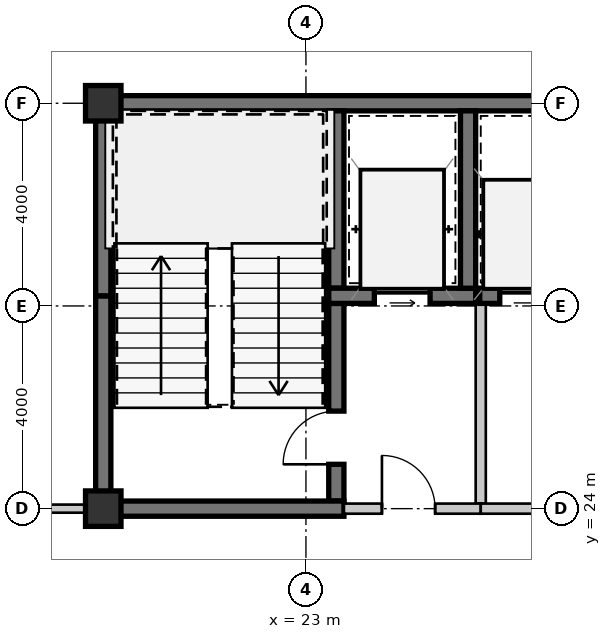
"""IFC4 building model, lengths in metres.
Left out: names, types, materials, properties, quantities, classifications, styles, units other than length and angle.
Written with IfcOpenShell. Run it as: python <this file> out.ifc"""

import sys

from ifc_helpers import new_model, si_unit, direction, frame, frame_2d, origin, origin_2d, place, context, subcontext, project, spatial, rectangle, extrude, source, transform, mapped, element, fill, save


model = new_model("IFC4")
c1 = context("Model", 3, precision=1e-05, world=origin(), true_north=direction((0.0, 1.0)))
c2 = subcontext(c1, "Body", "Model", "MODEL_VIEW")
j1 = project(units=[si_unit("LENGTHUNIT", "METRE"), si_unit("PLANEANGLEUNIT", "RADIAN")], contexts=[c1])
p1 = place(None, origin())
s1 = spatial("IfcSite", under=j1, at=p1, CompositionType="ELEMENT")
p2 = place(p1, origin())
s2 = spatial("IfcBuilding", under=s1, at=p2, CompositionType="ELEMENT")
p3 = place(p2, frame((0.0, 0.0, 93.45)))
s3 = spatial("IfcBuildingStorey", under=s2, at=p3, CompositionType="ELEMENT", Elevation=93.45)
m1 = source(origin(), c2, "Body", "SweptSolid", [
    extrude(rectangle(XDim=0.7, YDim=0.7, at=origin_2d()), origin(), (0.0, 0.0, 1.0), 3.15),
])
for number, where, z_axis, x_axis in (
    (1, (19.0, 24.0, 0.0), (0.0, 0.0, 1.0), (1.0, 0.0, 0.0)),
    (2, (19.0, 32.0, 0.0), (0.0, 0.0, 1.0), (1.0, 0.0, 0.0)),
):
    element("IfcColumn", number, at=place(p3, frame(where, z_axis=z_axis, x_axis=x_axis)), inside=s3, PredefinedType="COLUMN", context=c2, shape_type="MappedRepresentation", body=[
        mapped(m1, transform((0.0, 0.0, 0.0), scale=1.0)),
    ])
m2 = source(origin(), c2, "Body", "SweptSolid", [
    extrude(rectangle(XDim=9.15, YDim=0.3, at=frame_2d((4.575, 0.0))), origin(), (0.0, 0.0, 1.0), 2.93),
])
p4 = place(p3, frame((18.85, 32.0, 0.0), z_axis=(0.0, 0.0, 1.0), x_axis=(1.0, 0.0, 0.0)))
e3 = element("IfcWall", 3, at=p4, inside=s3, PredefinedType="SHEAR", context=c2, shape_type="MappedRepresentation", body=[
    mapped(m2, transform((0.0, 0.0, 0.0), scale=1.0)),
])
m3 = source(origin(), c2, "Body", "SweptSolid", [
    extrude(rectangle(XDim=4.05, YDim=0.3, at=frame_2d((2.025, 0.0))), origin(), (0.0, 0.0, 1.0), 2.93),
])
p5 = place(p3, frame((19.0, 24.15, 0.0), z_axis=(0.0, 0.0, 1.0), x_axis=(0.0, 1.0, 0.0)))
e4 = element("IfcWall", 4, at=p5, inside=s3, PredefinedType="SHEAR", context=c2, shape_type="MappedRepresentation", body=[
    mapped(m3, transform((0.0, 0.0, 0.0), scale=1.0)),
])
m4 = source(origin(), c2, "Body", "SweptSolid", [
    extrude(rectangle(XDim=3.65, YDim=0.3, at=frame_2d((1.825, 0.0))), origin(), (0.0, 0.0, 1.0), 2.93),
])
p6 = place(p3, frame((19.0, 28.2, 0.0), z_axis=(0.0, 0.0, 1.0), x_axis=(0.0, 1.0, 0.0)))
e5 = element("IfcWall", 5, at=p6, inside=s3, PredefinedType="SHEAR", context=c2, shape_type="MappedRepresentation", body=[
    mapped(m4, transform((0.0, 0.0, 0.0), scale=1.0)),
])
m5 = source(origin(), c2, "Body", "SweptSolid", [
    extrude(rectangle(XDim=3.5, YDim=0.3, at=frame_2d((1.75, 0.0))), origin(), (0.0, 0.0, 1.0), 2.93),
])
p7 = place(p3, frame((23.6, 28.35, 0.0), z_axis=(0.0, 0.0, 1.0), x_axis=(0.0, 1.0, 0.0)))
e6 = element("IfcWall", 6, at=p7, inside=s3, PredefinedType="SHEAR", context=c2, shape_type="MappedRepresentation", body=[
    mapped(m5, transform((0.0, 0.0, 0.0), scale=1.0)),
])
m6 = source(origin(), c2, "Body", "SweptSolid", [
    extrude(rectangle(XDim=3.9, YDim=0.3, at=frame_2d((1.95, 0.0))), origin(), (0.0, 0.0, 1.0), 2.93),
])
p8 = place(p3, frame((23.6, 24.15, 0.0), z_axis=(0.0, 0.0, 1.0), x_axis=(0.0, 1.0, 0.0)))
e7 = element("IfcWall", 7, at=p8, inside=s3, PredefinedType="SHEAR", context=c2, shape_type="MappedRepresentation", body=[
    mapped(m6, transform((0.0, 0.0, 0.0), scale=1.0)),
])
m7 = source(origin(), c2, "Body", "SweptSolid", [
    extrude(rectangle(XDim=1.05, YDim=2.1, at=frame_2d((0.525, 1.05))), frame((0.0, 0.16, 0.0), z_axis=(0.0, -1.0, 0.0), x_axis=(1.0, 0.0, 0.0)), (0.0, 0.0, 1.0), 0.32),
])
p9 = place(p8, frame((0.725, 0.0, 0.0)))
e8 = element("IfcOpeningElement", 8, at=p9, cuts=e7, PredefinedType="OPENING", context=c2, shape_type="MappedRepresentation", body=[
    mapped(m7, transform((0.0, 0.0, 0.0), scale=1.0)),
])
m8 = source(origin(), c2, "Body", "SweptSolid", [
    extrude(rectangle(XDim=4.9, YDim=0.3, at=frame_2d((2.45, 0.0))), origin(), (0.0, 0.0, 1.0), 2.93),
])
p10 = place(p3, frame((18.85, 24.0, 0.0), z_axis=(0.0, 0.0, 1.0), x_axis=(1.0, 0.0, 0.0)))
e9 = element("IfcWall", 9, at=p10, inside=s3, PredefinedType="SHEAR", context=c2, shape_type="MappedRepresentation", body=[
    mapped(m8, transform((0.0, 0.0, 0.0), scale=1.0)),
])
m9 = source(origin(), c2, "Body", "SweptSolid", [
    extrude(rectangle(XDim=2.9, YDim=0.3, at=frame_2d((1.45, 0.0))), origin(), (0.0, 0.0, 1.0), 2.93),
])
p11 = place(p3, frame((23.45, 28.2, 0.0), z_axis=(0.0, 0.0, 1.0), x_axis=(1.0, 0.0, 0.0)))
e10 = element("IfcWall", 10, at=p11, inside=s3, PredefinedType="SHEAR", context=c2, shape_type="MappedRepresentation", body=[
    mapped(m9, transform((0.0, 0.0, 0.0), scale=1.0)),
])
m10 = source(origin(), c2, "Body", "SweptSolid", [
    extrude(rectangle(XDim=1.1, YDim=2.15, at=frame_2d((0.55, 1.075))), frame((0.0, 0.16, 0.0), z_axis=(0.0, -1.0, 0.0), x_axis=(1.0, 0.0, 0.0)), (0.0, 0.0, 1.0), 0.32),
])
p12 = place(p11, frame((0.9, 0.0, 0.0)))
e11 = element("IfcOpeningElement", 11, at=p12, cuts=e10, PredefinedType="OPENING", context=c2, shape_type="MappedRepresentation", body=[
    mapped(m10, transform((0.0, 0.0, 0.0), scale=1.0)),
])
p13 = place(p3, frame((26.2, 28.35, 0.0), z_axis=(0.0, 0.0, 1.0), x_axis=(0.0, 1.0, 0.0)))
e12 = element("IfcWall", 12, at=p13, inside=s3, PredefinedType="SHEAR", context=c2, shape_type="MappedRepresentation", body=[
    mapped(m5, transform((0.0, 0.0, 0.0), scale=1.0)),
])
m11 = source(origin(), c2, "Body", "SweptSolid", [
    extrude(rectangle(XDim=3.95, YDim=0.2, at=frame_2d((1.975, 0.0))), origin(), (0.0, 0.0, 1.0), 2.93),
])
p14 = place(p3, frame((26.45, 24.1, 0.0), z_axis=(0.0, 0.0, 1.0), x_axis=(0.0, 1.0, 0.0)))
e13 = element("IfcWall", 13, at=p14, inside=s3, PredefinedType="SOLIDWALL", context=c2, shape_type="MappedRepresentation", body=[
    mapped(m11, transform((0.0, 0.0, 0.0), scale=1.0)),
])
m12 = source(origin(), c2, "Body", "SweptSolid", [
    extrude(rectangle(XDim=2.7, YDim=0.2, at=frame_2d((1.35, 0.0))), origin(), (0.0, 0.0, 1.0), 2.47),
])
p15 = place(p3, frame((23.75, 24.0, 0.0), z_axis=(0.0, 0.0, 1.0), x_axis=(1.0, 0.0, 0.0)))
e14 = element("IfcWall", 14, at=p15, inside=s3, PredefinedType="SOLIDWALL", context=c2, shape_type="MappedRepresentation", body=[
    mapped(m12, transform((0.0, 0.0, 0.0), scale=1.0)),
])
m13 = source(origin(), c2, "Body", "SweptSolid", [
    extrude(rectangle(XDim=1.05, YDim=2.1, at=frame_2d((0.525, 1.05))), frame((0.0, 0.11, 0.0), z_axis=(0.0, -1.0, 0.0), x_axis=(1.0, 0.0, 0.0)), (0.0, 0.0, 1.0), 0.22),
])
p16 = place(p15, frame((0.75, 0.0, 0.0)))
e15 = element("IfcOpeningElement", 15, at=p16, cuts=e14, PredefinedType="OPENING", context=c2, shape_type="MappedRepresentation", body=[
    mapped(m13, transform((0.0, 0.0, 0.0), scale=1.0)),
])
m14 = source(origin(), c2, "Body", "SweptSolid", [
    extrude(rectangle(XDim=2.07, YDim=0.3, at=frame_2d((1.035, 0.0))), origin(), (0.0, 0.0, 1.0), 2.93),
])
p17 = place(p3, frame((26.43, 28.2, 0.0), z_axis=(0.0, 0.0, 1.0), x_axis=(1.0, 0.0, 0.0)))
e16 = element("IfcWall", 16, at=p17, inside=s3, PredefinedType="SHEAR", context=c2, shape_type="MappedRepresentation", body=[
    mapped(m14, transform((0.0, 0.0, 0.0), scale=1.0)),
])
m15 = source(origin(), c2, "Body", "SweptSolid", [
    extrude(rectangle(XDim=1.05, YDim=2.15, at=frame_2d((0.525, 1.075))), frame((0.0, 0.16, 0.0), z_axis=(0.0, -1.0, 0.0), x_axis=(1.0, 0.0, 0.0)), (0.0, 0.0, 1.0), 0.32),
])
p18 = place(p17, frame((0.395, 0.0, 0.0)))
e17 = element("IfcOpeningElement", 17, at=p18, cuts=e16, PredefinedType="OPENING", context=c2, shape_type="MappedRepresentation", body=[
    mapped(m15, transform((0.0, 0.0, 0.0), scale=1.0)),
])
m16 = source(origin(), c2, "Body", "SweptSolid", [
    extrude(rectangle(XDim=4.35, YDim=0.2, at=frame_2d((2.175, 0.0))), origin(), (0.0, 0.0, 1.0), 2.47),
])
p19 = place(p3, frame((30.8, 24.0, 0.0), z_axis=(0.0, 0.0, 1.0), x_axis=(-1.0, 0.0, 0.0)))
e18 = element("IfcWall", 18, at=p19, inside=s3, PredefinedType="SOLIDWALL", context=c2, shape_type="MappedRepresentation", body=[
    mapped(m16, transform((0.0, 0.0, 0.0), scale=1.0)),
])
p20 = place(p19, frame((0.75, 0.0, 0.0)))
e19 = element("IfcOpeningElement", 19, at=p20, cuts=e18, PredefinedType="OPENING", context=c2, shape_type="MappedRepresentation", body=[
    mapped(m13, transform((0.0, 0.0, 0.0), scale=1.0)),
])
m17 = source(origin(), c2, "Body", "SweptSolid", [
    extrude(rectangle(XDim=4.17, YDim=0.16, at=frame_2d((2.085, 0.0))), origin(), (0.0, 0.0, 1.0), 2.93),
])
p21 = place(p3, frame((14.68, 24.0, 0.0), z_axis=(0.0, 0.0, 1.0), x_axis=(1.0, 0.0, 0.0)))
e20 = element("IfcWall", 20, at=p21, inside=s3, PredefinedType="PARTITIONING", context=c2, shape_type="MappedRepresentation", body=[
    mapped(m17, transform((0.0, 0.0, 0.0), scale=1.0)),
])
m18 = source(origin(), c2, "Body", "SweptSolid", [
    extrude(rectangle(XDim=0.92, YDim=2.1, at=frame_2d((0.46, 1.05))), frame((0.0, 0.09, 0.0), z_axis=(0.0, -1.0, 0.0), x_axis=(1.0, 0.0, 0.0)), (0.0, 0.0, 1.0), 0.18),
])
p22 = place(p21, frame((1.69, 0.0, 0.0)))
e21 = element("IfcOpeningElement", 21, at=p22, cuts=e20, PredefinedType="OPENING", context=c2, shape_type="MappedRepresentation", body=[
    mapped(m18, transform((0.0, 0.0, 0.0), scale=1.0)),
])
m19 = source(origin(), c2, "Body", "SweptSolid", [
    extrude(rectangle(XDim=1.05, YDim=2.1, at=frame_2d((0.525, 1.05))), frame((0.0, 0.025, 0.0), z_axis=(0.0, -1.0, 0.0), x_axis=(1.0, 0.0, 0.0)), (0.0, 0.0, 1.0), 0.05),
])
p23 = place(p9, origin())
e22 = element("IfcDoor", 22, at=p23, inside=s3, OperationType="SINGLE_SWING_LEFT", PredefinedType="DOOR", context=c2, shape_type="MappedRepresentation", body=[
    mapped(m19, transform((0.0, 0.0, 0.0), scale=1.0)),
])
fill(e8, e22)
m20 = source(origin(), c2, "Body", "SweptSolid", [
    extrude(rectangle(XDim=1.1, YDim=2.15, at=frame_2d((0.55, 1.075))), frame((0.0, 0.025, 0.0), z_axis=(0.0, -1.0, 0.0), x_axis=(1.0, 0.0, 0.0)), (0.0, 0.0, 1.0), 0.05),
])
p24 = place(p12, origin())
e23 = element("IfcDoor", 23, at=p24, inside=s3, OperationType="SLIDING_TO_LEFT", PredefinedType="DOOR", context=c2, shape_type="MappedRepresentation", body=[
    mapped(m20, transform((0.0, 0.0, 0.0), scale=1.0)),
])
fill(e11, e23)
p25 = place(p16, origin())
e24 = element("IfcDoor", 24, at=p25, inside=s3, OperationType="SINGLE_SWING_LEFT", PredefinedType="DOOR", context=c2, shape_type="MappedRepresentation", body=[
    mapped(m19, transform((0.0, 0.0, 0.0), scale=1.0)),
])
fill(e15, e24)
m21 = source(origin(), c2, "Body", "SweptSolid", [
    extrude(rectangle(XDim=1.05, YDim=2.15, at=frame_2d((0.525, 1.075))), frame((0.0, 0.025, 0.0), z_axis=(0.0, -1.0, 0.0), x_axis=(1.0, 0.0, 0.0)), (0.0, 0.0, 1.0), 0.05),
])
p26 = place(p18, origin())
e25 = element("IfcDoor", 25, at=p26, inside=s3, OperationType="SLIDING_TO_LEFT", PredefinedType="DOOR", context=c2, shape_type="MappedRepresentation", body=[
    mapped(m21, transform((0.0, 0.0, 0.0), scale=1.0)),
])
fill(e17, e25)
save(model, sys.argv[1])
